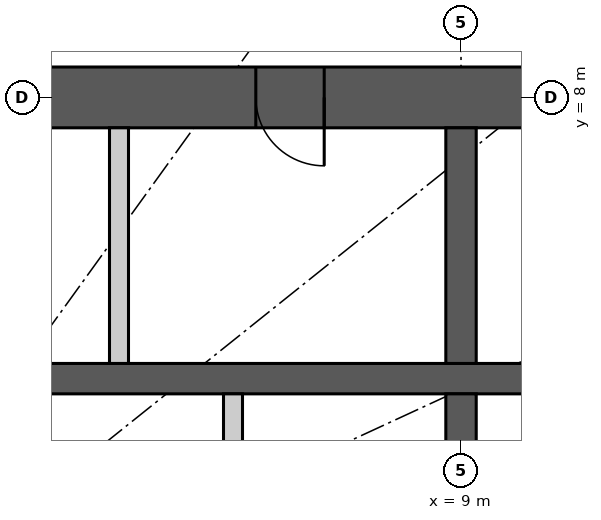
"""IFC4 building model, lengths in metres.
Left out: names, types, materials, properties, quantities, classifications, styles, units other than length and angle.
Written with IfcOpenShell. Run it as: python <this file> out.ifc"""

import sys

from ifc_helpers import new_model, si_unit, direction, frame, frame_2d, origin, place, context, subcontext, project, spatial, rectangle, extrude, element, fill, save


model = new_model("IFC4")
c1 = context("Model", 3, precision=1e-05, world=origin(), true_north=direction((0.0, 1.0)))
c2 = subcontext(c1, "Body", "Model", "MODEL_VIEW")
j1 = project(units=[si_unit("LENGTHUNIT", "METRE"), si_unit("PLANEANGLEUNIT", "RADIAN")], contexts=[c1])
p1 = place(None, origin())
s1 = spatial("IfcSite", under=j1, at=p1, CompositionType="ELEMENT")
p2 = place(p1, origin())
s2 = spatial("IfcBuilding", under=s1, at=p2, CompositionType="ELEMENT")
p3 = place(p2, frame((0.0, 0.0, 150.0)))
s3 = spatial("IfcBuildingStorey", under=s2, at=p3, CompositionType="ELEMENT", Elevation=150.0)
p4 = place(p3, frame((-12.4, 8.0, 0.0), z_axis=(0.0, 0.0, 1.0), x_axis=(1.0, 0.0, 0.0)))
e1 = element("IfcWall", 1, at=p4, inside=s3, PredefinedType="SHEAR", context=c2, shape_type="SweptSolid", body=[
    extrude(rectangle(XDim=24.8, YDim=0.8, at=frame_2d((12.4, 0.0))), origin(), (0.0, 0.0, 1.0), 3.3),
])
p5 = place(p4, frame((11.1, 0.0, 0.0)))
e2 = element("IfcOpeningElement", 2, at=p5, cuts=e1, PredefinedType="OPENING", context=c2, shape_type="SweptSolid", body=[
    extrude(rectangle(XDim=1.2, YDim=2.2, at=frame_2d((0.6, 1.1))), frame((0.0, 0.41, 0.0), z_axis=(0.0, -1.0, 0.0), x_axis=(1.0, 0.0, 0.0)), (0.0, 0.0, 1.0), 0.82),
])
p6 = place(p4, frame((18.7, 0.0, 0.0)))
e3 = element("IfcOpeningElement", 3, at=p6, cuts=e1, PredefinedType="OPENING", context=c2, shape_type="SweptSolid", body=[
    extrude(rectangle(XDim=0.9, YDim=2.2, at=frame_2d((0.45, 1.1))), frame((0.0, 0.41, 0.0), z_axis=(0.0, -1.0, 0.0), x_axis=(1.0, 0.0, 0.0)), (0.0, 0.0, 1.0), 0.82),
])
p7 = place(p3, frame((-11.6, 4.3, 0.0), z_axis=(0.0, 0.0, 1.0), x_axis=(1.0, 0.0, 0.0)))
e4 = element("IfcWall", 4, at=p7, inside=s3, PredefinedType="SHEAR", context=c2, shape_type="SweptSolid", body=[
    extrude(rectangle(XDim=23.2, YDim=0.4, at=frame_2d((11.6, 0.0))), origin(), (0.0, 0.0, 1.0), 3.3),
])
p8 = place(p3, frame((9.0, 4.5, 0.0), z_axis=(0.0, 0.0, 1.0), x_axis=(0.0, 1.0, 0.0)))
e5 = element("IfcWall", 5, at=p8, inside=s3, PredefinedType="SHEAR", context=c2, shape_type="SweptSolid", body=[
    extrude(rectangle(XDim=3.1, YDim=0.4, at=frame_2d((1.55, 0.0))), origin(), (0.0, 0.0, 1.0), 3.3),
])
p9 = place(p3, frame((9.0, 1.75, 0.0), z_axis=(0.0, 0.0, 1.0), x_axis=(0.0, 1.0, 0.0)))
e6 = element("IfcWall", 6, at=p9, inside=s3, PredefinedType="SHEAR", context=c2, shape_type="SweptSolid", body=[
    extrude(rectangle(XDim=2.35, YDim=0.4, at=frame_2d((1.175, 0.0))), origin(), (0.0, 0.0, 1.0), 3.3),
])
p10 = place(p3, frame((4.5, 4.5, 0.0), z_axis=(0.0, 0.0, 1.0), x_axis=(0.0, 1.0, 0.0)))
e7 = element("IfcWall", 7, at=p10, inside=s3, PredefinedType="PARTITIONING", context=c2, shape_type="SweptSolid", body=[
    extrude(rectangle(XDim=3.1, YDim=0.25, at=frame_2d((1.55, 0.0))), origin(), (0.0, 0.0, 1.0), 3.3),
])
p11 = place(p3, frame((6.0, 1.75, 0.0), z_axis=(0.0, 0.0, 1.0), x_axis=(0.0, 1.0, 0.0)))
e8 = element("IfcWall", 8, at=p11, inside=s3, PredefinedType="PARTITIONING", context=c2, shape_type="SweptSolid", body=[
    extrude(rectangle(XDim=2.35, YDim=0.25, at=frame_2d((1.175, 0.0))), origin(), (0.0, 0.0, 1.0), 3.3),
])
p12 = place(p6, origin())
e9 = element("IfcDoor", 9, at=p12, inside=s3, OperationType="SINGLE_SWING_RIGHT", PredefinedType="DOOR", context=c2, shape_type="SweptSolid", body=[
    extrude(rectangle(XDim=0.9, YDim=2.2, at=frame_2d((0.45, 1.1))), frame((0.0, 0.025, 0.0), z_axis=(0.0, -1.0, 0.0), x_axis=(1.0, 0.0, 0.0)), (0.0, 0.0, 1.0), 0.05),
])
fill(e3, e9)
save(model, sys.argv[1])
